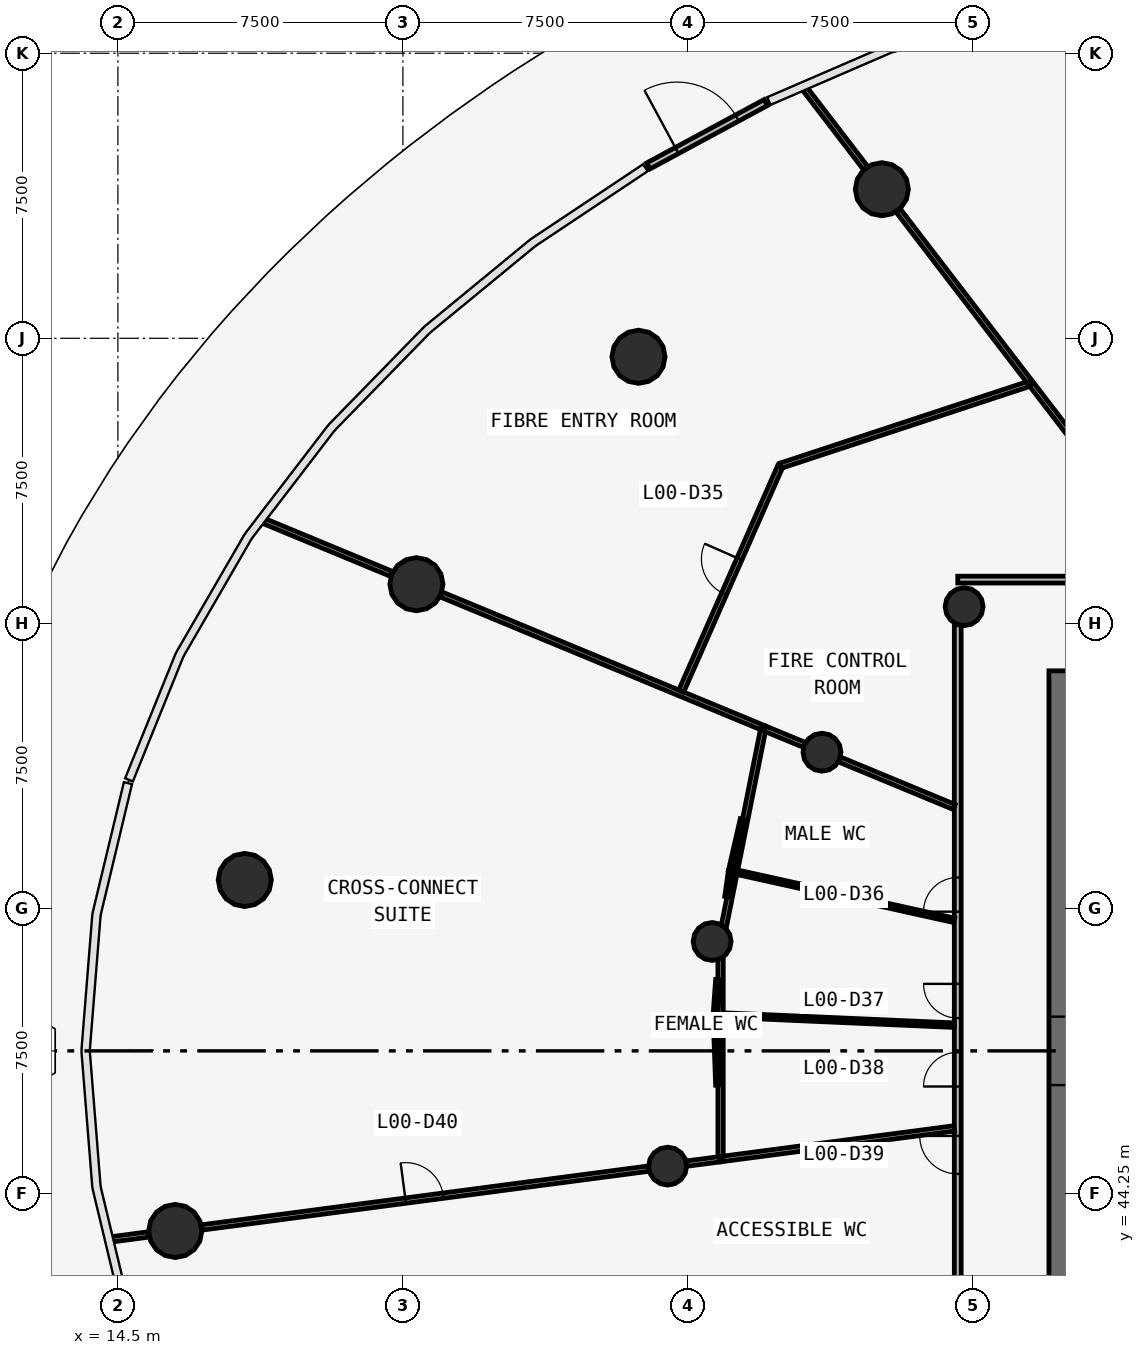
"""IFC4 building model, lengths in metres.
Left out: names, types, materials, properties, quantities, classifications, styles, units other than length and angle.
Written with IfcOpenShell. Run it as: python <this file> out.ifc"""

import sys

from ifc_helpers import new_model, si_unit, direction, frame, frame_2d, origin, origin_2d, place, context, subcontext, project, spatial, rectangle, circle, extrude, source, transform, mapped, element, fill, save


model = new_model("IFC4")
c1 = context("Model", 3, precision=1e-05, world=origin(), true_north=direction((0.0, 1.0)))
c2 = subcontext(c1, "Body", "Model", "MODEL_VIEW")
j1 = project(units=[si_unit("LENGTHUNIT", "METRE"), si_unit("PLANEANGLEUNIT", "RADIAN")], contexts=[c1])
p1 = place(None, origin())
s1 = spatial("IfcSite", under=j1, at=p1, CompositionType="ELEMENT")
p2 = place(p1, origin())
s2 = spatial("IfcBuilding", under=s1, at=p2, CompositionType="ELEMENT")
p3 = place(p2, origin())
s3 = spatial("IfcBuildingStorey", under=s2, at=p3, CompositionType="ELEMENT", Elevation=0.0)
p4 = place(p3, frame((39.5, 58.0, -0.35), z_axis=(0.0, 0.0, 1.0), x_axis=(0.0, -1.0, 0.0)))
e1 = element("IfcWall", 1, at=p4, inside=s3, PredefinedType="SHEAR", context=c2, shape_type="SweptSolid", body=[
    extrude(rectangle(XDim=20.0, YDim=1.0, at=frame_2d((10.0, 0.0))), origin(), (0.0, 0.0, 1.0), 5.35),
])
p5 = place(p4, frame((9.1, 0.0, 0.35)))
e2 = element("IfcOpeningElement", 2, at=p5, cuts=e1, PredefinedType="OPENING", context=c2, shape_type="SweptSolid", body=[
    extrude(rectangle(XDim=1.8, YDim=2.1, at=frame_2d((0.9, 1.05))), frame((0.0, 0.51, 0.0), z_axis=(0.0, -1.0, 0.0), x_axis=(1.0, 0.0, 0.0)), (0.0, 0.0, 1.0), 1.02),
])
m1 = source(origin(), c2, "Body", "SweptSolid", [
    extrude(circle(Radius=0.7, at=origin_2d()), origin(), (0.0, 0.0, 1.0), 5.35),
])
for number, where, z_axis, x_axis in (
    (3, (34.604, 70.672, -0.35), (0.0, 0.0, 1.0), (1.0, 0.0, 0.0)),
    (4, (28.199, 66.263, -0.35), (0.0, 0.0, 1.0), (1.0, 0.0, 0.0)),
    (5, (22.355, 60.279, -0.35), (0.0, 0.0, 1.0), (1.0, 0.0, 0.0)),
    (6, (17.839, 52.497, -0.35), (0.0, 0.0, 1.0), (1.0, 0.0, 0.0)),
    (7, (16.01, 43.262, -0.35), (0.0, 0.0, 1.0), (1.0, 0.0, 0.0)),
):
    element("IfcColumn", number, at=place(p3, frame(where, z_axis=z_axis, x_axis=x_axis)), inside=s3, PredefinedType="COLUMN", context=c2, shape_type="MappedRepresentation", body=[
        mapped(m1, transform((0.0, 0.0, 0.0), scale=1.0)),
    ])
m2 = source(origin(), c2, "Body", "SweptSolid", [
    extrude(circle(Radius=0.5, at=origin_2d()), origin(), (0.0, 0.0, 1.0), 5.35),
])
for number, where, z_axis, x_axis in (
    (8, (36.768, 59.688, -0.35), (0.0, 0.0, 1.0), (1.0, 0.0, 0.0)),
    (9, (33.028, 55.859, -0.35), (0.0, 0.0, 1.0), (1.0, 0.0, 0.0)),
    (10, (30.137, 50.878, -0.35), (0.0, 0.0, 1.0), (1.0, 0.0, 0.0)),
    (11, (28.966, 44.968, -0.35), (0.0, 0.0, 1.0), (1.0, 0.0, 0.0)),
):
    element("IfcColumn", number, at=place(p3, frame(where, z_axis=z_axis, x_axis=x_axis)), inside=s3, PredefinedType="COLUMN", context=c2, shape_type="MappedRepresentation", body=[
        mapped(m2, transform((0.0, 0.0, 0.0), scale=1.0)),
    ])
p6 = place(p3, frame((28.458, 71.284, 0.0), z_axis=(0.0, 0.0, 1.0), x_axis=(0.880004187443, 0.474965925181, 0.0)))
e12 = element("IfcWall", 12, at=p6, inside=s3, PredefinedType="STANDARD", context=c2, shape_type="SweptSolid", body=[
    extrude(rectangle(XDim=3.512, YDim=0.18, at=frame_2d((1.756, 0.0))), origin(), (0.0, 0.0, 1.0), 4.65),
])
p7 = place(p6, frame((0.856, 0.0, 0.0)))
e13 = element("IfcOpeningElement", 13, at=p7, cuts=e12, PredefinedType="OPENING", context=c2, shape_type="SweptSolid", body=[
    extrude(rectangle(XDim=1.8, YDim=2.2, at=frame_2d((0.9, 1.1))), frame((0.0, 0.1, 0.0), z_axis=(0.0, -1.0, 0.0), x_axis=(1.0, 0.0, 0.0)), (0.0, 0.0, 1.0), 0.2),
])
p8 = place(p3, frame((36.6, 60.4, 0.0), z_axis=(0.0, 0.0, 1.0), x_axis=(1.0, 0.0, 0.0)))
e14 = element("IfcWall", 14, at=p8, inside=s3, PredefinedType="PARTITIONING", context=c2, shape_type="SweptSolid", body=[
    extrude(rectangle(XDim=30.8, YDim=0.18, at=frame_2d((15.4, 0.0))), origin(), (0.0, 0.0, 1.0), 3.85),
])
p9 = place(p8, frame((14.95, 0.0, 0.0)))
e15 = element("IfcOpeningElement", 15, at=p9, cuts=e14, PredefinedType="OPENING", context=c2, shape_type="SweptSolid", body=[
    extrude(rectangle(XDim=1.0, YDim=2.1, at=frame_2d((0.5, 1.05))), frame((0.0, 0.1, 0.0), z_axis=(0.0, -1.0, 0.0), x_axis=(1.0, 0.0, 0.0)), (0.0, 0.0, 1.0), 0.2),
])
p10 = place(p8, frame((12.55, 0.0, 0.0)))
e16 = element("IfcOpeningElement", 16, at=p10, cuts=e14, PredefinedType="OPENING", context=c2, shape_type="SweptSolid", body=[
    extrude(rectangle(XDim=1.0, YDim=2.1, at=frame_2d((0.5, 1.05))), frame((0.0, 0.1, 0.0), z_axis=(0.0, -1.0, 0.0), x_axis=(1.0, 0.0, 0.0)), (0.0, 0.0, 1.0), 0.2),
])
p11 = place(p3, frame((36.6, 35.63, 0.0), z_axis=(0.0, 0.0, 1.0), x_axis=(0.0, 1.0, 0.0)))
e17 = element("IfcWall", 17, at=p11, inside=s3, PredefinedType="PARTITIONING", context=c2, shape_type="SweptSolid", body=[
    extrude(rectangle(XDim=23.583, YDim=0.18, at=frame_2d((11.791, 0.0))), origin(), (0.0, 0.0, 1.0), 3.85),
])
p12 = place(p11, frame((16.032, 0.0, 0.0)))
e18 = element("IfcOpeningElement", 18, at=p12, cuts=e17, PredefinedType="OPENING", context=c2, shape_type="SweptSolid", body=[
    extrude(rectangle(XDim=0.9, YDim=2.1, at=frame_2d((0.45, 1.05))), frame((0.0, 0.1, 0.0), z_axis=(0.0, -1.0, 0.0), x_axis=(1.0, 0.0, 0.0)), (0.0, 0.0, 1.0), 0.2),
])
p13 = place(p11, frame((13.232, 0.0, 0.0)))
e19 = element("IfcOpeningElement", 19, at=p13, cuts=e17, PredefinedType="OPENING", context=c2, shape_type="SweptSolid", body=[
    extrude(rectangle(XDim=0.9, YDim=2.1, at=frame_2d((0.45, 1.05))), frame((0.0, 0.1, 0.0), z_axis=(0.0, -1.0, 0.0), x_axis=(1.0, 0.0, 0.0)), (0.0, 0.0, 1.0), 0.2),
])
p14 = place(p11, frame((11.433, 0.0, 0.0)))
e20 = element("IfcOpeningElement", 20, at=p14, cuts=e17, PredefinedType="OPENING", context=c2, shape_type="SweptSolid", body=[
    extrude(rectangle(XDim=0.9, YDim=2.1, at=frame_2d((0.45, 1.05))), frame((0.0, 0.1, 0.0), z_axis=(0.0, -1.0, 0.0), x_axis=(1.0, 0.0, 0.0)), (0.0, 0.0, 1.0), 0.2),
])
p15 = place(p11, frame((9.133, 0.0, 0.0)))
e21 = element("IfcOpeningElement", 21, at=p15, cuts=e17, PredefinedType="OPENING", context=c2, shape_type="SweptSolid", body=[
    extrude(rectangle(XDim=1.0, YDim=2.1, at=frame_2d((0.5, 1.05))), frame((0.0, 0.1, 0.0), z_axis=(0.0, -1.0, 0.0), x_axis=(1.0, 0.0, 0.0)), (0.0, 0.0, 1.0), 0.2),
])
p16 = place(p3, frame((16.708, 43.354, 0.0), z_axis=(0.0, 0.0, 1.0), x_axis=(0.991446586451, 0.130513088287, 0.0)))
e22 = element("IfcWall", 22, at=p16, inside=s3, PredefinedType="PARTITIONING", context=c2, shape_type="SweptSolid", body=[
    extrude(rectangle(XDim=11.86, YDim=0.14, at=frame_2d((5.93, 0.0))), origin(), (0.0, 0.0, 1.0), 3.85),
])
p17 = place(p16, frame((5.41, 0.0, 0.0)))
e23 = element("IfcOpeningElement", 23, at=p17, cuts=e22, PredefinedType="OPENING", context=c2, shape_type="SweptSolid", body=[
    extrude(rectangle(XDim=1.0, YDim=2.1, at=frame_2d((0.5, 1.05))), frame((0.0, 0.08, 0.0), z_axis=(0.0, -1.0, 0.0), x_axis=(1.0, 0.0, 0.0)), (0.0, 0.0, 1.0), 0.16),
])
p18 = place(p3, frame((23.007, 60.01, 0.0), z_axis=(0.0, 0.0, 1.0), x_axis=(0.923871278923, -0.382703357682, 0.0)))
e24 = element("IfcWall", 24, at=p18, inside=s3, PredefinedType="PARTITIONING", context=c2, shape_type="SweptSolid", body=[
    extrude(rectangle(XDim=9.179, YDim=0.14, at=frame_2d((4.59, 0.0))), origin(), (0.0, 0.0, 1.0), 3.85),
])
p19 = place(p3, frame((38.521, 65.566, 0.0), z_axis=(0.0, 0.0, 1.0), x_axis=(-0.949758707301, -0.31298306329, 0.0)))
e25 = element("IfcWall", 25, at=p19, inside=s3, PredefinedType="PARTITIONING", context=c2, shape_type="SweptSolid", body=[
    extrude(rectangle(XDim=6.934, YDim=0.14, at=frame_2d((3.467, 0.0))), origin(), (0.0, 0.0, 1.0), 3.85),
])
p20 = place(p3, frame((29.324, 57.469, 0.0), z_axis=(0.0, 0.0, 1.0), x_axis=(0.403258856744, 0.915085949219, 0.0)))
e26 = element("IfcWall", 26, at=p20, inside=s3, PredefinedType="PARTITIONING", context=c2, shape_type="SweptSolid", body=[
    extrude(rectangle(XDim=6.447, YDim=0.14, at=frame_2d((3.224, 0.0))), origin(), (0.0, 0.0, 1.0), 3.85),
])
p21 = place(p20, frame((2.797, 0.0, 0.0)))
e27 = element("IfcOpeningElement", 27, at=p21, cuts=e26, PredefinedType="OPENING", context=c2, shape_type="SweptSolid", body=[
    extrude(rectangle(XDim=1.0, YDim=2.1, at=frame_2d((0.5, 1.05))), frame((0.0, 0.08, 0.0), z_axis=(0.0, -1.0, 0.0), x_axis=(1.0, 0.0, 0.0)), (0.0, 0.0, 1.0), 0.16),
])
p22 = place(p3, frame((36.51, 45.961, 0.0), z_axis=(0.0, 0.0, 1.0), x_axis=(-0.991444112872, -0.130531877526, 0.0)))
e28 = element("IfcWall", 28, at=p22, inside=s3, PredefinedType="PARTITIONING", context=c2, shape_type="SweptSolid", body=[
    extrude(rectangle(XDim=6.204, YDim=0.14, at=frame_2d((3.102, 0.0))), origin(), (0.0, 0.0, 1.0), 3.85),
])
p23 = place(p3, frame((38.476, 65.625, 0.0), z_axis=(0.0, 0.0, 1.0), x_axis=(-0.608780259513, 0.793338890782, 0.0)))
e29 = element("IfcWall", 29, at=p23, inside=s3, PredefinedType="PARTITIONING", context=c2, shape_type="SweptSolid", body=[
    extrude(rectangle(XDim=5.658, YDim=0.14, at=frame_2d((2.829, 0.0))), origin(), (0.0, 0.0, 1.0), 3.85),
])
p24 = place(p3, frame((31.481, 56.467, 0.0), z_axis=(0.0, 0.0, 1.0), x_axis=(-0.195841094628, -0.98063564368, 0.0)))
e30 = element("IfcWall", 30, at=p24, inside=s3, PredefinedType="PARTITIONING", context=c2, shape_type="SweptSolid", body=[
    extrude(rectangle(XDim=5.292, YDim=0.14, at=frame_2d((2.646, 0.0))), origin(), (0.0, 0.0, 1.0), 3.85),
])
p25 = place(p3, frame((30.359, 50.426, 0.0), z_axis=(0.0, 0.0, 1.0), x_axis=(0.0, -1.0, 0.0)))
e31 = element("IfcWall", 31, at=p25, inside=s3, PredefinedType="PARTITIONING", context=c2, shape_type="SweptSolid", body=[
    extrude(rectangle(XDim=5.204, YDim=0.14, at=frame_2d((2.602, 0.0))), origin(), (0.0, 0.0, 1.0), 3.85),
])
p26 = place(p3, frame((21.704, 60.549, 0.0), z_axis=(0.0, 0.0, 1.0), x_axis=(-0.923890168451, 0.382657753926, 0.0)))
e32 = element("IfcWall", 32, at=p26, inside=s3, PredefinedType="PARTITIONING", context=c2, shape_type="SweptSolid", body=[
    extrude(rectangle(XDim=3.641, YDim=0.14, at=frame_2d((1.821, 0.0))), origin(), (0.0, 0.0, 1.0), 3.85),
])
p27 = place(p3, frame((32.561, 56.052, 0.0), z_axis=(0.0, 0.0, 1.0), x_axis=(-0.923916959191, 0.382593063867, 0.0)))
e33 = element("IfcWall", 33, at=p27, inside=s3, PredefinedType="PARTITIONING", context=c2, shape_type="SweptSolid", body=[
    extrude(rectangle(XDim=1.132, YDim=0.14, at=frame_2d((0.566, 0.0))), origin(), (0.0, 0.0, 1.0), 3.85),
])
p28 = place(p3, frame((36.51, 54.416, 0.0), z_axis=(0.0, 0.0, 1.0), x_axis=(-0.923911109142, 0.382607190737, 0.0)))
e34 = element("IfcWall", 34, at=p28, inside=s3, PredefinedType="PARTITIONING", context=c2, shape_type="SweptSolid", body=[
    extrude(rectangle(XDim=3.264, YDim=0.14, at=frame_2d((1.632, 0.0))), origin(), (0.0, 0.0, 1.0), 3.85),
])
p29 = place(p3, frame((40.559, 62.91, 0.0), z_axis=(0.0, 0.0, 1.0), x_axis=(-0.608771391178, 0.79334569595, 0.0)))
e35 = element("IfcWall", 35, at=p29, inside=s3, PredefinedType="PARTITIONING", context=c2, shape_type="SweptSolid", body=[
    extrude(rectangle(XDim=3.317, YDim=0.14, at=frame_2d((1.659, 0.0))), origin(), (0.0, 0.0, 1.0), 3.85),
])
p30 = place(p3, frame((34.175, 71.23, 0.0), z_axis=(0.0, 0.0, 1.0), x_axis=(-0.608811983243, 0.793314546104, 0.0)))
e36 = element("IfcWall", 36, at=p30, inside=s3, PredefinedType="PARTITIONING", context=c2, shape_type="SweptSolid", body=[
    extrude(rectangle(XDim=2.627, YDim=0.14, at=frame_2d((1.313, 0.0))), origin(), (0.0, 0.0, 1.0), 3.85),
])
p31 = place(p3, frame((15.311, 43.17, 0.0), z_axis=(0.0, 0.0, 1.0), x_axis=(-0.991417173479, -0.130736330569, 0.0)))
e37 = element("IfcWall", 37, at=p31, inside=s3, PredefinedType="PARTITIONING", context=c2, shape_type="SweptSolid", body=[
    extrude(rectangle(XDim=1.008, YDim=0.14, at=frame_2d((0.504, 0.0))), origin(), (0.0, 0.0, 1.0), 3.85),
])
p32 = place(p3, frame((30.33, 45.147, 0.0), z_axis=(0.0, 0.0, 1.0), x_axis=(-0.991463836503, -0.130381980762, 0.0)))
e38 = element("IfcWall", 38, at=p32, inside=s3, PredefinedType="PARTITIONING", context=c2, shape_type="SweptSolid", body=[
    extrude(rectangle(XDim=0.871, YDim=0.14, at=frame_2d((0.435, 0.0))), origin(), (0.0, 0.0, 1.0), 3.85),
])
p33 = place(p3, frame((36.51, 48.676, 0.0), z_axis=(0.0, 0.0, 1.0), x_axis=(-0.999047282882, 0.043640881831, 0.0)))
e39 = element("IfcWall", 39, at=p33, inside=s3, PredefinedType="PARTITIONING", context=c2, shape_type="SweptSolid", body=[
    extrude(rectangle(XDim=6.087, YDim=0.12, at=frame_2d((3.043, 0.0))), origin(), (0.0, 0.0, 1.0), 3.85),
])
p34 = place(p3, frame((36.51, 51.434, 0.0), z_axis=(0.0, 0.0, 1.0), x_axis=(-0.976294005345, 0.216448643166, 0.0)))
e40 = element("IfcWall", 40, at=p34, inside=s3, PredefinedType="PARTITIONING", context=c2, shape_type="SweptSolid", body=[
    extrude(rectangle(XDim=5.848, YDim=0.12, at=frame_2d((2.924, 0.0))), origin(), (0.0, 0.0, 1.0), 3.85),
])
p35 = place(p3, frame((30.936, 54.094, 0.0), z_axis=(0.0, 0.0, 1.0), x_axis=(-0.223615873723, -0.974677352265, 0.0)))
e41 = element("IfcWall", 41, at=p35, inside=s3, PredefinedType="PARTITIONING", context=c2, shape_type="SweptSolid", body=[
    extrude(rectangle(XDim=1.391, YDim=0.12, at=frame_2d((0.695, 0.0))), origin(), (0.0, 0.0, 1.0), 3.85),
])
p36 = place(p3, frame((30.223, 48.951, 0.0), z_axis=(0.0, 0.0, 1.0), x_axis=(0.035987753471, -0.999352230998, 0.0)))
e42 = element("IfcWall", 42, at=p36, inside=s3, PredefinedType="PARTITIONING", context=c2, shape_type="SweptSolid", body=[
    extrude(rectangle(XDim=1.852, YDim=0.12, at=frame_2d((0.926, 0.0))), origin(), (0.0, 0.0, 1.0), 3.85),
])
p37 = place(p3, frame((30.289, 49.875, 0.0), z_axis=(0.0, 0.0, 1.0), x_axis=(-0.071846587552, -0.997415694611, 0.0)))
e43 = element("IfcWall", 43, at=p37, inside=s3, PredefinedType="PARTITIONING", context=c2, shape_type="SweptSolid", body=[
    extrude(rectangle(XDim=0.897, YDim=0.12, at=frame_2d((0.448, 0.0))), origin(), (0.0, 0.0, 1.0), 3.85),
])
p38 = place(p3, frame((30.621, 52.709, 0.0), z_axis=(0.0, 0.0, 1.0), x_axis=(-0.139396840512, -0.990236598422, 0.0)))
e44 = element("IfcWall", 44, at=p38, inside=s3, PredefinedType="PARTITIONING", context=c2, shape_type="SweptSolid", body=[
    extrude(rectangle(XDim=0.658, YDim=0.12, at=frame_2d((0.329, 0.0))), origin(), (0.0, 0.0, 1.0), 3.85),
])
m3 = source(origin(), c2, "Body", "SweptSolid", [
    extrude(rectangle(XDim=1.8, YDim=2.2, at=frame_2d((0.9, 1.1))), frame((0.0, 0.025, 0.0), z_axis=(0.0, -1.0, 0.0), x_axis=(1.0, 0.0, 0.0)), (0.0, 0.0, 1.0), 0.05),
])
p39 = place(p7, origin())
e45 = element("IfcDoor", 45, at=p39, inside=s3, OperationType="DOUBLE_DOOR_SINGLE_SWING", PredefinedType="DOOR", context=c2, shape_type="MappedRepresentation", body=[
    mapped(m3, transform((0.0, 0.0, 0.0), scale=1.0)),
])
fill(e13, e45)
m4 = source(origin(), c2, "Body", "SweptSolid", [
    extrude(rectangle(XDim=1.0, YDim=2.1, at=frame_2d((0.5, 1.05))), frame((0.0, 0.025, 0.0), z_axis=(0.0, -1.0, 0.0), x_axis=(1.0, 0.0, 0.0)), (0.0, 0.0, 1.0), 0.05),
])
p40 = place(p21, origin())
e46 = element("IfcDoor", 46, at=p40, inside=s3, OperationType="SINGLE_SWING_RIGHT", PredefinedType="DOOR", context=c2, shape_type="MappedRepresentation", body=[
    mapped(m4, transform((0.0, 0.0, 0.0), scale=1.0)),
])
fill(e27, e46)
m5 = source(origin(), c2, "Body", "SweptSolid", [
    extrude(rectangle(XDim=0.9, YDim=2.1, at=frame_2d((0.45, 1.05))), frame((0.0, 0.025, 0.0), z_axis=(0.0, -1.0, 0.0), x_axis=(1.0, 0.0, 0.0)), (0.0, 0.0, 1.0), 0.05),
])
p41 = place(p12, origin())
e47 = element("IfcDoor", 47, at=p41, inside=s3, OperationType="SINGLE_SWING_LEFT", PredefinedType="DOOR", context=c2, shape_type="MappedRepresentation", body=[
    mapped(m5, transform((0.0, 0.0, 0.0), scale=1.0)),
])
fill(e18, e47)
p42 = place(p13, origin())
e48 = element("IfcDoor", 48, at=p42, inside=s3, OperationType="SINGLE_SWING_RIGHT", PredefinedType="DOOR", context=c2, shape_type="MappedRepresentation", body=[
    mapped(m5, transform((0.0, 0.0, 0.0), scale=1.0)),
])
fill(e19, e48)
p43 = place(p14, origin())
e49 = element("IfcDoor", 49, at=p43, inside=s3, OperationType="SINGLE_SWING_LEFT", PredefinedType="DOOR", context=c2, shape_type="MappedRepresentation", body=[
    mapped(m5, transform((0.0, 0.0, 0.0), scale=1.0)),
])
fill(e20, e49)
m6 = source(origin(), c2, "Body", "SweptSolid", [
    extrude(rectangle(XDim=1.0, YDim=2.1, at=frame_2d((0.5, 1.05))), frame((0.0, 0.025, 0.0), z_axis=(0.0, -1.0, 0.0), x_axis=(1.0, 0.0, 0.0)), (0.0, 0.0, 1.0), 0.05),
])
p44 = place(p15, origin())
e50 = element("IfcDoor", 50, at=p44, inside=s3, OperationType="SINGLE_SWING_RIGHT", PredefinedType="DOOR", context=c2, shape_type="MappedRepresentation", body=[
    mapped(m6, transform((0.0, 0.0, 0.0), scale=1.0)),
])
fill(e21, e50)
p45 = place(p17, origin())
e51 = element("IfcDoor", 51, at=p45, inside=s3, OperationType="SINGLE_SWING_LEFT", PredefinedType="DOOR", context=c2, shape_type="MappedRepresentation", body=[
    mapped(m6, transform((0.0, 0.0, 0.0), scale=1.0)),
])
fill(e23, e51)
save(model, sys.argv[1])
